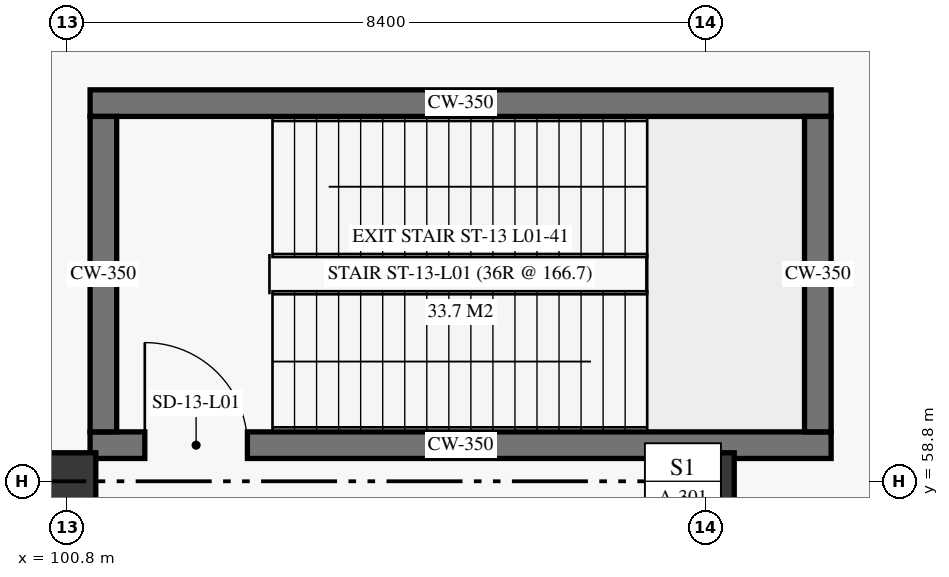
"""IFC4 building model, lengths in metres.
Left out: names, types, materials, properties, quantities, classifications, styles, units other than length and angle.
Written with IfcOpenShell. Run it as: python <this file> out.ifc"""

import sys

from ifc_helpers import new_model, si_unit, direction, frame, frame_2d, origin, origin_2d, place, context, subcontext, project, spatial, rectangle, extrude, element, fill, save


model = new_model("IFC4")
c1 = context("Model", 3, precision=1e-05, world=origin(), true_north=direction((0.0, 1.0)))
c2 = subcontext(c1, "Body", "Model", "MODEL_VIEW")
j1 = project(units=[si_unit("LENGTHUNIT", "METRE"), si_unit("PLANEANGLEUNIT", "RADIAN")], contexts=[c1])
p1 = place(None, origin())
s1 = spatial("IfcSite", under=j1, at=p1, CompositionType="ELEMENT")
p2 = place(p1, origin())
s2 = spatial("IfcBuilding", under=s1, at=p2, CompositionType="ELEMENT")
p3 = place(p2, origin())
s3 = spatial("IfcBuildingStorey", under=s2, at=p3, CompositionType="ELEMENT", Elevation=0.0)
for number, where, z_axis, x_axis in (
    (1, (100.8, 58.8, 0.0), (0.0, 0.0, 1.0), (1.0, 0.0, 0.0)),
    (2, (109.2, 58.8, 0.0), (0.0, 0.0, 1.0), (1.0, 0.0, 0.0)),
):
    element("IfcColumn", number, at=place(p3, frame(where, z_axis=z_axis, x_axis=x_axis)), inside=s3, PredefinedType="COLUMN", context=c2, shape_type="SweptSolid", body=[
        extrude(rectangle(XDim=0.75, YDim=0.75, at=origin_2d()), origin(), (0.0, 0.0, 1.0), 5.7),
    ])
p4 = place(p3, frame((101.1, 59.275, 0.0), z_axis=(0.0, 0.0, 1.0), x_axis=(1.0, 0.0, 0.0)))
e3 = element("IfcWall", 3, at=p4, inside=s3, PredefinedType="SHEAR", context=c2, shape_type="SweptSolid", body=[
    extrude(rectangle(XDim=9.75, YDim=0.35, at=frame_2d((4.875, 0.0))), origin(), (0.0, 0.0, 1.0), 5.7),
])
p5 = place(p4, frame((0.72, 0.0, 0.0)))
e4 = element("IfcOpeningElement", 4, at=p5, cuts=e3, PredefinedType="OPENING", context=c2, shape_type="SweptSolid", body=[
    extrude(rectangle(XDim=1.35, YDim=2.25, at=frame_2d((0.675, 1.125))), frame((0.0, 0.185, 0.0), z_axis=(0.0, -1.0, 0.0), x_axis=(1.0, 0.0, 0.0)), (0.0, 0.0, 1.0), 0.37),
])
p6 = place(p3, frame((101.1, 63.775, 0.0), z_axis=(0.0, 0.0, 1.0), x_axis=(1.0, 0.0, 0.0)))
e5 = element("IfcWall", 5, at=p6, inside=s3, PredefinedType="SHEAR", context=c2, shape_type="SweptSolid", body=[
    extrude(rectangle(XDim=9.75, YDim=0.35, at=frame_2d((4.875, 0.0))), origin(), (0.0, 0.0, 1.0), 5.7),
])
for number, where, z_axis, x_axis in (
    (6, (101.275, 59.45, 0.0), (0.0, 0.0, 1.0), (0.0, 1.0, 0.0)),
    (7, (110.675, 59.45, 0.0), (0.0, 0.0, 1.0), (0.0, 1.0, 0.0)),
):
    element("IfcWall", number, at=place(p3, frame(where, z_axis=z_axis, x_axis=x_axis)), inside=s3, PredefinedType="SHEAR", context=c2, shape_type="SweptSolid", body=[
        extrude(rectangle(XDim=4.15, YDim=0.35, at=frame_2d((2.075, 0.0))), origin(), (0.0, 0.0, 1.0), 5.7),
    ])
p7 = place(p5, origin())
e8 = element("IfcDoor", 8, at=p7, inside=s3, OperationType="SINGLE_SWING_LEFT", PredefinedType="DOOR", context=c2, shape_type="SweptSolid", body=[
    extrude(rectangle(XDim=1.35, YDim=2.25, at=frame_2d((0.675, 1.125))), frame((0.0, 0.025, 0.0), z_axis=(0.0, -1.0, 0.0), x_axis=(1.0, 0.0, 0.0)), (0.0, 0.0, 1.0), 0.05),
])
fill(e4, e8)
save(model, sys.argv[1])
